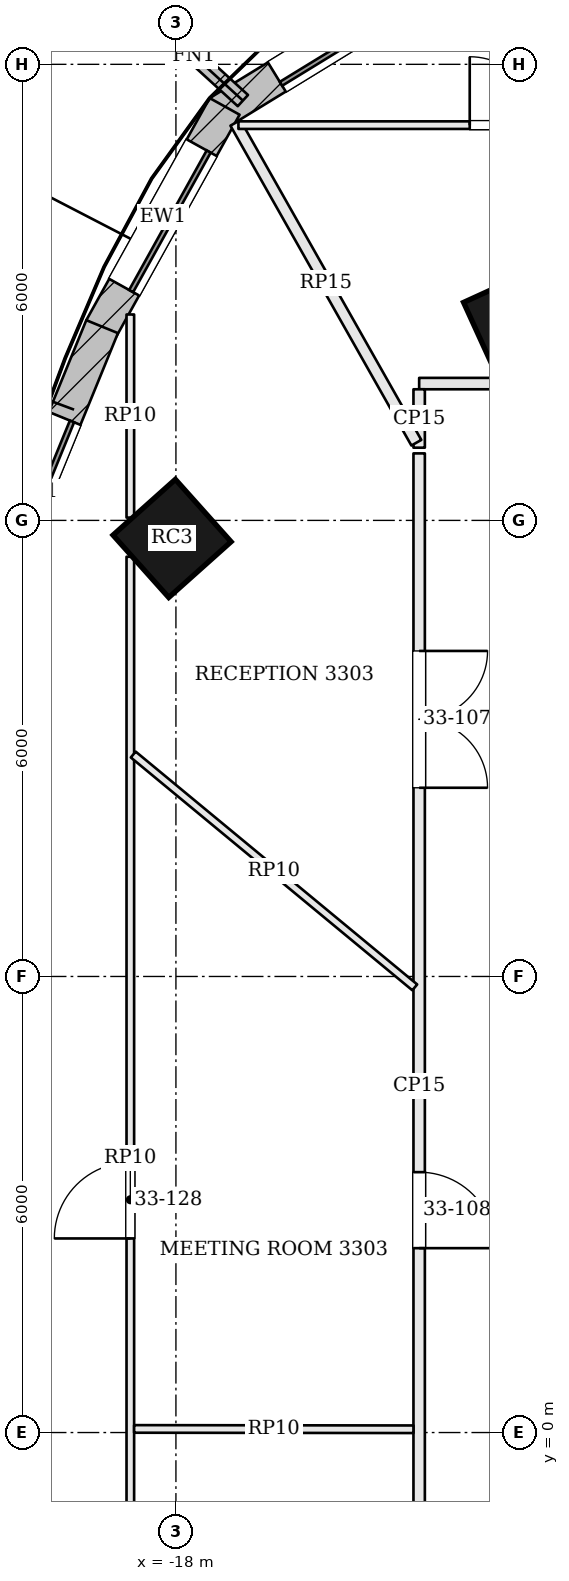
"""IFC4 building model, lengths in metres.
Left out: names, types, materials, properties, quantities, classifications, styles, units other than length and angle.
Written with IfcOpenShell. Run it as: python <this file> out.ifc"""

import sys

from ifc_helpers import new_model, si_unit, direction, frame, frame_2d, origin, origin_2d, place, context, subcontext, project, spatial, rectangle, extrude, element, fill, save


model = new_model("IFC4")
c1 = context("Model", 3, precision=1e-05, world=origin(), true_north=direction((0.0, 1.0)))
c2 = subcontext(c1, "Body", "Model", "MODEL_VIEW")
j1 = project(units=[si_unit("LENGTHUNIT", "METRE"), si_unit("PLANEANGLEUNIT", "RADIAN")], contexts=[c1])
p1 = place(None, origin())
s1 = spatial("IfcSite", under=j1, at=p1, CompositionType="ELEMENT")
p2 = place(p1, origin())
s2 = spatial("IfcBuilding", under=s1, at=p2, CompositionType="ELEMENT")
p3 = place(p2, frame((0.0, 0.0, 138.3)))
s3 = spatial("IfcBuildingStorey", under=s2, at=p3, CompositionType="ELEMENT", Elevation=138.3)
for number, where, z_axis, x_axis in (
    (1, (-13.487, 14.596, 0.0), (0.0, 0.0, 1.0), (-0.91, -0.415, 0.0)),
    (2, (-18.051, 11.763, 0.0), (0.0, 0.0, 1.0), (-0.746, -0.666, 0.0)),
):
    element("IfcColumn", number, at=place(p3, frame(where, z_axis=z_axis, x_axis=x_axis)), inside=s3, PredefinedType="COLUMN", context=c2, shape_type="SweptSolid", body=[
        extrude(rectangle(XDim=1.1, YDim=1.1, at=origin_2d()), origin(), (0.0, 0.0, 1.0), 3.9),
    ])
p4 = place(p3, frame((-14.116, 19.4, 0.0), z_axis=(0.0, 0.0, 1.0), x_axis=(-0.852622865325, -0.522526793117, 0.0)))
e3 = element("IfcWall", 3, at=p4, inside=s3, PredefinedType="SOLIDWALL", context=c2, shape_type="SweptSolid", body=[
    extrude(rectangle(XDim=3.896, YDim=0.45, at=frame_2d((1.948, 0.0))), origin(), (0.0, 0.0, 1.0), 3.7),
])
p5 = place(p4, frame((0.898, 0.0, 0.9)))
e4 = element("IfcOpeningElement", 4, at=p5, cuts=e3, PredefinedType="OPENING", context=c2, shape_type="SweptSolid", body=[
    extrude(rectangle(XDim=2.1, YDim=2.3, at=frame_2d((1.05, 1.15))), frame((0.0, 0.235, 0.0), z_axis=(0.0, -1.0, 0.0), x_axis=(1.0, 0.0, 0.0)), (0.0, 0.0, 1.0), 0.47),
])
p6 = place(p3, frame((-17.359, 17.447, 0.0), z_axis=(0.0, 0.0, 1.0), x_axis=(-0.485618126214, -0.874171056197, 0.0)))
e5 = element("IfcWall", 5, at=p6, inside=s3, PredefinedType="SOLIDWALL", context=c2, shape_type="SweptSolid", body=[
    extrude(rectangle(XDim=3.343, YDim=0.45, at=frame_2d((1.671, 0.0))), origin(), (0.0, 0.0, 1.0), 3.7),
])
p7 = place(p6, frame((0.621, 0.0, 0.9)))
e6 = element("IfcOpeningElement", 6, at=p7, cuts=e5, PredefinedType="OPENING", context=c2, shape_type="SweptSolid", body=[
    extrude(rectangle(XDim=2.1, YDim=2.3, at=frame_2d((1.05, 1.15))), frame((0.0, 0.235, 0.0), z_axis=(0.0, -1.0, 0.0), x_axis=(1.0, 0.0, 0.0)), (0.0, 0.0, 1.0), 0.47),
])
p8 = place(p3, frame((-18.971, 14.549, 0.0), z_axis=(0.0, 0.0, 1.0), x_axis=(-0.378434936431, -0.925627894398, 0.0)))
e7 = element("IfcWall", 7, at=p8, inside=s3, PredefinedType="SOLIDWALL", context=c2, shape_type="SweptSolid", body=[
    extrude(rectangle(XDim=4.708, YDim=0.45, at=frame_2d((2.354, 0.0))), origin(), (0.0, 0.0, 1.0), 3.7),
])
p9 = place(p8, frame((1.304, 0.0, 0.9)))
e8 = element("IfcOpeningElement", 8, at=p9, cuts=e7, PredefinedType="OPENING", context=c2, shape_type="SweptSolid", body=[
    extrude(rectangle(XDim=2.1, YDim=2.3, at=frame_2d((1.05, 1.15))), frame((0.0, 0.235, 0.0), z_axis=(0.0, -1.0, 0.0), x_axis=(1.0, 0.0, 0.0)), (0.0, 0.0, 1.0), 0.47),
])
p10 = place(p3, frame((-17.119, 17.523, 0.0), z_axis=(0.0, 0.0, 1.0), x_axis=(-0.737866019047, 0.674947211221, 0.0)))
e9 = element("IfcWall", 9, at=p10, inside=s3, PredefinedType="SOLIDWALL", context=c2, shape_type="SweptSolid", body=[
    extrude(rectangle(XDim=1.75, YDim=0.2, at=frame_2d((0.875, 0.0))), origin(), (0.0, 0.0, 1.0), 3.7),
])
p11 = place(p3, frame((3.012, 13.8, 0.0), z_axis=(0.0, 0.0, 1.0), x_axis=(-1.0, 0.0, 0.0)))
e10 = element("IfcWall", 10, at=p11, inside=s3, PredefinedType="PARTITIONING", context=c2, shape_type="SweptSolid", body=[
    extrude(rectangle(XDim=17.812, YDim=0.15, at=frame_2d((8.906, 0.0))), origin(), (0.0, 0.0, 1.0), 3.198),
])
p12 = place(p11, frame((3.342, 0.0, 0.0)))
e11 = element("IfcOpeningElement", 11, at=p12, cuts=e10, PredefinedType="OPENING", context=c2, shape_type="SweptSolid", body=[
    extrude(rectangle(XDim=1.8, YDim=2.1, at=frame_2d((0.9, 1.05))), frame((0.0, 0.085, 0.0), z_axis=(0.0, -1.0, 0.0), x_axis=(1.0, 0.0, 0.0)), (0.0, 0.0, 1.0), 0.17),
])
p13 = place(p11, frame((9.659, 0.0, 0.0)))
e12 = element("IfcOpeningElement", 12, at=p13, cuts=e10, PredefinedType="OPENING", context=c2, shape_type="SweptSolid", body=[
    extrude(rectangle(XDim=1.0, YDim=2.4, at=frame_2d((0.5, 1.2))), frame((0.0, 0.085, 0.0), z_axis=(0.0, -1.0, 0.0), x_axis=(1.0, 0.0, 0.0)), (0.0, 0.0, 1.0), 0.17),
])
p14 = place(p11, frame((14.25, 0.0, 0.0)))
e13 = element("IfcOpeningElement", 13, at=p14, cuts=e10, PredefinedType="OPENING", context=c2, shape_type="SweptSolid", body=[
    extrude(rectangle(XDim=1.0, YDim=2.1, at=frame_2d((0.5, 1.05))), frame((0.0, 0.085, 0.0), z_axis=(0.0, -1.0, 0.0), x_axis=(1.0, 0.0, 0.0)), (0.0, 0.0, 1.0), 0.17),
])
p15 = place(p3, frame((-14.8, 13.725, 0.0), z_axis=(0.0, 0.0, 1.0), x_axis=(0.0, -1.0, 0.0)))
e14 = element("IfcWall", 14, at=p15, inside=s3, PredefinedType="PARTITIONING", context=c2, shape_type="SweptSolid", body=[
    extrude(rectangle(XDim=0.769, YDim=0.15, at=frame_2d((0.384, 0.0))), origin(), (0.0, 0.0, 1.0), 3.198),
])
p16 = place(p3, frame((-17.218, 17.23, 0.0), z_axis=(0.0, 0.0, 1.0), x_axis=(0.492436580725, -0.870348329098, 0.0)))
e15 = element("IfcWall", 15, at=p16, inside=s3, PredefinedType="PARTITIONING", context=c2, shape_type="SweptSolid", body=[
    extrude(rectangle(XDim=4.835, YDim=0.15, at=frame_2d((2.417, 0.0))), origin(), (0.0, 0.0, 1.0), 3.198),
])
p17 = place(p3, frame((-14.8, 12.882, 0.0), z_axis=(0.0, 0.0, 1.0), x_axis=(0.0, -1.0, 0.0)))
e16 = element("IfcWall", 16, at=p17, inside=s3, PredefinedType="PARTITIONING", context=c2, shape_type="SweptSolid", body=[
    extrude(rectangle(XDim=16.652, YDim=0.15, at=frame_2d((8.326, 0.0))), origin(), (0.0, 0.0, 1.0), 3.198),
])
p18 = place(p17, frame((2.599, 0.0, 0.0)))
e17 = element("IfcOpeningElement", 17, at=p18, cuts=e16, PredefinedType="OPENING", context=c2, shape_type="SweptSolid", body=[
    extrude(rectangle(XDim=1.8, YDim=2.1, at=frame_2d((0.9, 1.05))), frame((0.0, 0.085, 0.0), z_axis=(0.0, -1.0, 0.0), x_axis=(1.0, 0.0, 0.0)), (0.0, 0.0, 1.0), 0.17),
])
p19 = place(p17, frame((9.456, 0.0, 0.0)))
e18 = element("IfcOpeningElement", 18, at=p19, cuts=e16, PredefinedType="OPENING", context=c2, shape_type="SweptSolid", body=[
    extrude(rectangle(XDim=1.0, YDim=2.4, at=frame_2d((0.5, 1.2))), frame((0.0, 0.085, 0.0), z_axis=(0.0, -1.0, 0.0), x_axis=(1.0, 0.0, 0.0)), (0.0, 0.0, 1.0), 0.17),
])
p20 = place(p17, frame((14.15, 0.0, 0.0)))
e19 = element("IfcOpeningElement", 19, at=p20, cuts=e16, PredefinedType="OPENING", context=c2, shape_type="SweptSolid", body=[
    extrude(rectangle(XDim=1.0, YDim=2.1, at=frame_2d((0.5, 1.05))), frame((0.0, 0.085, 0.0), z_axis=(0.0, -1.0, 0.0), x_axis=(1.0, 0.0, 0.0)), (0.0, 0.0, 1.0), 0.17),
])
p21 = place(p3, frame((-17.178, 17.2, 0.0), z_axis=(0.0, 0.0, 1.0), x_axis=(1.0, 0.0, 0.0)))
e20 = element("IfcWall", 20, at=p21, inside=s3, PredefinedType="PARTITIONING", context=c2, shape_type="SweptSolid", body=[
    extrude(rectangle(XDim=13.585, YDim=0.1, at=frame_2d((6.792, 0.0))), origin(), (0.0, 0.0, 1.0), 3.184),
])
p22 = place(p21, frame((3.043, 0.0, 0.0)))
e21 = element("IfcOpeningElement", 21, at=p22, cuts=e20, PredefinedType="OPENING", context=c2, shape_type="SweptSolid", body=[
    extrude(rectangle(XDim=0.9, YDim=2.1, at=frame_2d((0.45, 1.05))), frame((0.0, 0.06, 0.0), z_axis=(0.0, -1.0, 0.0), x_axis=(1.0, 0.0, 0.0)), (0.0, 0.0, 1.0), 0.12),
])
p23 = place(p3, frame((-18.6, -5.397, 0.0), z_axis=(0.0, 0.0, 1.0), x_axis=(0.0, 1.0, 0.0)))
e22 = element("IfcWall", 22, at=p23, inside=s3, PredefinedType="PARTITIONING", context=c2, shape_type="SweptSolid", body=[
    extrude(rectangle(XDim=16.919, YDim=0.1, at=frame_2d((8.459, 0.0))), origin(), (0.0, 0.0, 1.0), 3.184),
])
p24 = place(p23, frame((1.975, 0.0, 0.0)))
e23 = element("IfcOpeningElement", 23, at=p24, cuts=e22, PredefinedType="OPENING", context=c2, shape_type="SweptSolid", body=[
    extrude(rectangle(XDim=0.9, YDim=2.1, at=frame_2d((0.45, 1.05))), frame((0.0, 0.06, 0.0), z_axis=(0.0, -1.0, 0.0), x_axis=(1.0, 0.0, 0.0)), (0.0, 0.0, 1.0), 0.12),
])
p25 = place(p23, frame((7.95, 0.0, 0.0)))
e24 = element("IfcOpeningElement", 24, at=p25, cuts=e22, PredefinedType="OPENING", context=c2, shape_type="SweptSolid", body=[
    extrude(rectangle(XDim=1.0, YDim=2.4, at=frame_2d((0.5, 1.2))), frame((0.0, 0.06, 0.0), z_axis=(0.0, -1.0, 0.0), x_axis=(1.0, 0.0, 0.0)), (0.0, 0.0, 1.0), 0.12),
])
p26 = place(p3, frame((-18.6, 12.037, 0.0), z_axis=(0.0, 0.0, 1.0), x_axis=(0.0, 1.0, 0.0)))
e25 = element("IfcWall", 25, at=p26, inside=s3, PredefinedType="PARTITIONING", context=c2, shape_type="SweptSolid", body=[
    extrude(rectangle(XDim=2.672, YDim=0.1, at=frame_2d((1.336, 0.0))), origin(), (0.0, 0.0, 1.0), 3.184),
])
p27 = place(p3, frame((-14.858, 5.857, 0.0), z_axis=(0.0, 0.0, 1.0), x_axis=(-0.770605931108, 0.637311932213, 0.0)))
e26 = element("IfcWall", 26, at=p27, inside=s3, PredefinedType="PARTITIONING", context=c2, shape_type="SweptSolid", body=[
    extrude(rectangle(XDim=4.806, YDim=0.1, at=frame_2d((2.403, 0.0))), origin(), (0.0, 0.0, 1.0), 3.184),
])
p28 = place(p3, frame((-14.875, 0.043, 0.0), z_axis=(0.0, 0.0, 1.0), x_axis=(-0.999999285062, 0.001195774074, 0.0)))
e27 = element("IfcWall", 27, at=p28, inside=s3, PredefinedType="PARTITIONING", context=c2, shape_type="SweptSolid", body=[
    extrude(rectangle(XDim=3.675, YDim=0.1, at=frame_2d((1.837, 0.0))), origin(), (0.0, 0.0, 1.0), 3.184),
])
p29 = place(p5, origin())
e28 = element("IfcWindow", 28, at=p29, inside=s3, PartitioningType="SINGLE_PANEL", PredefinedType="WINDOW", context=c2, shape_type="SweptSolid", body=[
    extrude(rectangle(XDim=2.1, YDim=2.3, at=frame_2d((1.05, 1.15))), frame((0.0, 0.135, 0.0), z_axis=(0.0, -1.0, 0.0), x_axis=(1.0, 0.0, 0.0)), (0.0, 0.0, 1.0), 0.06),
])
fill(e4, e28)
p30 = place(p7, origin())
e29 = element("IfcWindow", 29, at=p30, inside=s3, PartitioningType="SINGLE_PANEL", PredefinedType="WINDOW", context=c2, shape_type="SweptSolid", body=[
    extrude(rectangle(XDim=2.1, YDim=2.3, at=frame_2d((1.05, 1.15))), frame((0.0, 0.135, 0.0), z_axis=(0.0, -1.0, 0.0), x_axis=(1.0, 0.0, 0.0)), (0.0, 0.0, 1.0), 0.06),
])
fill(e6, e29)
p31 = place(p9, origin())
e30 = element("IfcWindow", 30, at=p31, inside=s3, PartitioningType="SINGLE_PANEL", PredefinedType="WINDOW", context=c2, shape_type="SweptSolid", body=[
    extrude(rectangle(XDim=2.1, YDim=2.3, at=frame_2d((1.05, 1.15))), frame((0.0, 0.135, 0.0), z_axis=(0.0, -1.0, 0.0), x_axis=(1.0, 0.0, 0.0)), (0.0, 0.0, 1.0), 0.06),
])
fill(e8, e30)
p32 = place(p22, origin())
e31 = element("IfcDoor", 31, at=p32, inside=s3, OperationType="SINGLE_SWING_LEFT", PredefinedType="DOOR", context=c2, shape_type="SweptSolid", body=[
    extrude(rectangle(XDim=0.9, YDim=2.1, at=frame_2d((0.45, 1.05))), frame((0.0, 0.025, 0.0), z_axis=(0.0, -1.0, 0.0), x_axis=(1.0, 0.0, 0.0)), (0.0, 0.0, 1.0), 0.05),
])
fill(e21, e31)
p33 = place(p18, origin())
e32 = element("IfcDoor", 32, at=p33, inside=s3, OperationType="DOUBLE_DOOR_SINGLE_SWING", PredefinedType="DOOR", context=c2, shape_type="SweptSolid", body=[
    extrude(rectangle(XDim=1.8, YDim=2.1, at=frame_2d((0.9, 1.05))), frame((0.0, 0.025, 0.0), z_axis=(0.0, -1.0, 0.0), x_axis=(1.0, 0.0, 0.0)), (0.0, 0.0, 1.0), 0.05),
])
fill(e17, e32)
p34 = place(p19, origin())
e33 = element("IfcDoor", 33, at=p34, inside=s3, OperationType="SINGLE_SWING_RIGHT", PredefinedType="DOOR", context=c2, shape_type="SweptSolid", body=[
    extrude(rectangle(XDim=1.0, YDim=2.4, at=frame_2d((0.5, 1.2))), frame((0.0, 0.025, 0.0), z_axis=(0.0, -1.0, 0.0), x_axis=(1.0, 0.0, 0.0)), (0.0, 0.0, 1.0), 0.05),
])
fill(e18, e33)
p35 = place(p25, origin())
e34 = element("IfcDoor", 34, at=p35, inside=s3, OperationType="SINGLE_SWING_LEFT", PredefinedType="DOOR", context=c2, shape_type="SweptSolid", body=[
    extrude(rectangle(XDim=1.0, YDim=2.4, at=frame_2d((0.5, 1.2))), frame((0.0, 0.025, 0.0), z_axis=(0.0, -1.0, 0.0), x_axis=(1.0, 0.0, 0.0)), (0.0, 0.0, 1.0), 0.05),
])
fill(e24, e34)
save(model, sys.argv[1])
